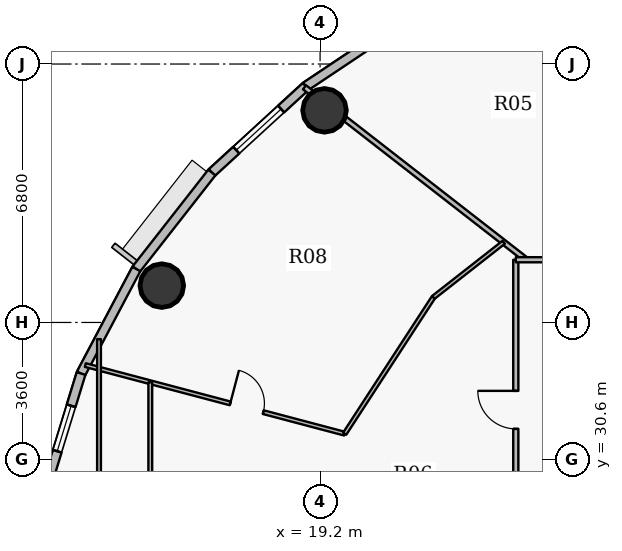
"""IFC4 building model, lengths in metres.
Left out: names, types, materials, properties, quantities, classifications, styles, units other than length and angle.
Written with IfcOpenShell. Run it as: python <this file> out.ifc"""

import sys

from ifc_helpers import new_model, si_unit, direction, frame, frame_2d, origin, origin_2d, place, context, subcontext, project, spatial, rectangle, hollow_circle, extrude, source, transform, mapped, element, fill, save


model = new_model("IFC4")
c1 = context("Model", 3, precision=1e-05, world=origin(), true_north=direction((0.0, 1.0)))
c2 = subcontext(c1, "Body", "Model", "MODEL_VIEW")
j1 = project(units=[si_unit("LENGTHUNIT", "METRE"), si_unit("PLANEANGLEUNIT", "RADIAN")], contexts=[c1])
p1 = place(None, origin())
s1 = spatial("IfcSite", under=j1, at=p1, CompositionType="ELEMENT")
p2 = place(p1, origin())
s2 = spatial("IfcBuilding", under=s1, at=p2, CompositionType="ELEMENT")
p3 = place(p2, frame((0.0, 0.0, 240.3)))
s3 = spatial("IfcBuildingStorey", under=s2, at=p3, CompositionType="ELEMENT", Elevation=240.3)
for number, where, z_axis, x_axis in (
    (1, (19.317, 39.781, 0.0), (0.0, 0.0, 1.0), (1.0, 0.0, 0.0)),
    (2, (15.035, 35.169, 0.0), (0.0, 0.0, 1.0), (1.0, 0.0, 0.0)),
):
    element("IfcColumn", number, at=place(p3, frame(where, z_axis=z_axis, x_axis=x_axis)), inside=s3, PredefinedType="COLUMN", context=c2, shape_type="SweptSolid", body=[
        extrude(hollow_circle(Radius=0.575, WallThickness=0.036, at=origin_2d()), origin(), (0.0, 0.0, 1.0), 3.75),
    ])
p4 = place(p3, frame((18.824, 40.411, 0.0), z_axis=(0.0, 0.0, 1.0), x_axis=(0.831262496074, 0.555880079352, 0.0)))
e3 = element("IfcWall", 3, at=p4, inside=s3, PredefinedType="SOLIDWALL", context=c2, shape_type="SweptSolid", body=[
    extrude(rectangle(XDim=3.484, YDim=0.24, at=frame_2d((1.742, 0.0))), origin(), (0.0, 0.0, 1.0), 3.5),
])
p5 = place(p3, frame((16.352, 38.145, 0.0), z_axis=(0.0, 0.0, 1.0), x_axis=(0.737123922599, 0.675757591694, 0.0)))
e4 = element("IfcWall", 4, at=p5, inside=s3, PredefinedType="SOLIDWALL", context=c2, shape_type="SweptSolid", body=[
    extrude(rectangle(XDim=3.354, YDim=0.24, at=frame_2d((1.677, 0.0))), origin(), (0.0, 0.0, 1.0), 3.5),
])
p6 = place(p5, frame((0.873, 0.0, 0.9)))
e5 = element("IfcOpeningElement", 5, at=p6, cuts=e4, PredefinedType="OPENING", context=c2, shape_type="SweptSolid", body=[
    extrude(rectangle(XDim=1.6, YDim=1.75, at=origin_2d()), frame((0.8, 0.13, 0.875), z_axis=(0.0, -1.0, 0.0), x_axis=(1.0, 0.0, 0.0)), (0.0, 0.0, 1.0), 0.26),
])
p7 = place(p3, frame((14.364, 35.605, 0.0), z_axis=(0.0, 0.0, 1.0), x_axis=(0.616312344705, 0.787501805562, 0.0)))
e6 = element("IfcWall", 6, at=p7, inside=s3, PredefinedType="SOLIDWALL", context=c2, shape_type="SweptSolid", body=[
    extrude(rectangle(XDim=3.225, YDim=0.24, at=frame_2d((1.612, 0.0))), origin(), (0.0, 0.0, 1.0), 3.5),
])
p8 = place(p3, frame((12.91, 32.856, 0.0), z_axis=(0.0, 0.0, 1.0), x_axis=(0.46766049993, 0.883908172157, 0.0)))
e7 = element("IfcWall", 7, at=p8, inside=s3, PredefinedType="SOLIDWALL", context=c2, shape_type="SweptSolid", body=[
    extrude(rectangle(XDim=3.11, YDim=0.24, at=frame_2d((1.555, 0.0))), origin(), (0.0, 0.0, 1.0), 3.5),
])
p9 = place(p3, frame((12.023, 29.964, 0.0), z_axis=(0.0, 0.0, 1.0), x_axis=(0.293132907334, 0.95607170162, 0.0)))
e8 = element("IfcWall", 8, at=p9, inside=s3, PredefinedType="SOLIDWALL", context=c2, shape_type="SweptSolid", body=[
    extrude(rectangle(XDim=3.025, YDim=0.24, at=frame_2d((1.512, 0.0))), origin(), (0.0, 0.0, 1.0), 3.5),
])
p10 = place(p9, frame((0.887, 0.0, 0.9)))
e9 = element("IfcOpeningElement", 9, at=p10, cuts=e8, PredefinedType="OPENING", context=c2, shape_type="SweptSolid", body=[
    extrude(rectangle(XDim=1.25, YDim=1.65, at=origin_2d()), frame((0.625, 0.13, 0.825), z_axis=(0.0, -1.0, 0.0), x_axis=(1.0, 0.0, 0.0)), (0.0, 0.0, 1.0), 0.26),
])
p11 = place(p3, frame((13.022, 33.079, 0.0), z_axis=(0.0, 0.0, 1.0), x_axis=(0.966904841433, -0.255137272097, 0.0)))
e10 = element("IfcWall", 10, at=p11, inside=s3, PredefinedType="PARTITIONING", context=c2, shape_type="SweptSolid", body=[
    extrude(rectangle(XDim=0.373, YDim=0.1, at=frame_2d((0.187, 0.0))), origin(), (0.0, 0.0, 1.0), 3.5),
])
p12 = place(p3, frame((13.392, 32.981, 0.0), z_axis=(0.0, 0.0, 1.0), x_axis=(0.966739802164, -0.255761910595, 0.0)))
e11 = element("IfcWall", 11, at=p12, inside=s3, PredefinedType="PARTITIONING", context=c2, shape_type="SweptSolid", body=[
    extrude(rectangle(XDim=6.677, YDim=0.1, at=frame_2d((3.339, 0.0))), origin(), (0.0, 0.0, 1.0), 2.985),
])
p13 = place(p12, frame((3.561, 0.0, 0.0)))
e12 = element("IfcOpeningElement", 12, at=p13, cuts=e11, PredefinedType="OPENING", context=c2, shape_type="SweptSolid", body=[
    extrude(rectangle(XDim=0.9, YDim=2.1, at=origin_2d()), frame((0.45, 0.06, 1.05), z_axis=(0.0, -1.0, 0.0), x_axis=(1.0, 0.0, 0.0)), (0.0, 0.0, 1.0), 0.12),
])
p14 = place(p3, frame((13.383, 23.724, 0.0), z_axis=(0.0, 0.0, 1.0), x_axis=(0.0, 1.0, 0.0)))
e13 = element("IfcWall", 13, at=p14, inside=s3, PredefinedType="PARTITIONING", context=c2, shape_type="SweptSolid", body=[
    extrude(rectangle(XDim=10.037, YDim=0.1, at=frame_2d((5.019, 0.0))), origin(), (0.0, 0.0, 1.0), 2.935),
])
p15 = place(p14, frame((4.608, 0.0, 0.0)))
e14 = element("IfcOpeningElement", 14, at=p15, cuts=e13, PredefinedType="OPENING", context=c2, shape_type="SweptSolid", body=[
    extrude(rectangle(XDim=0.82, YDim=2.1, at=origin_2d()), frame((0.41, 0.06, 1.05), z_axis=(0.0, -1.0, 0.0), x_axis=(1.0, 0.0, 0.0)), (0.0, 0.0, 1.0), 0.12),
])
p16 = place(p3, frame((14.732, 23.919, 0.0), z_axis=(0.0, 0.0, 1.0), x_axis=(0.0, 1.0, 0.0)))
e15 = element("IfcWall", 15, at=p16, inside=s3, PredefinedType="PARTITIONING", context=c2, shape_type="SweptSolid", body=[
    extrude(rectangle(XDim=8.708, YDim=0.1, at=frame_2d((4.354, 0.0))), origin(), (0.0, 0.0, 1.0), 2.935),
])
p17 = place(p16, frame((3.904, 0.0, 0.0)))
e16 = element("IfcOpeningElement", 16, at=p17, cuts=e15, PredefinedType="OPENING", context=c2, shape_type="SweptSolid", body=[
    extrude(rectangle(XDim=0.9, YDim=2.1, at=origin_2d()), frame((0.45, 0.06, 1.05), z_axis=(0.0, -1.0, 0.0), x_axis=(1.0, 0.0, 0.0)), (0.0, 0.0, 1.0), 0.12),
])
p18 = place(p3, frame((18.791, 40.387, 0.0), z_axis=(0.0, 0.0, 1.0), x_axis=(0.789302404173, -0.614004653701, 0.0)))
e17 = element("IfcWall", 17, at=p18, inside=s3, PredefinedType="PARTITIONING", context=c2, shape_type="SweptSolid", body=[
    extrude(rectangle(XDim=7.39, YDim=0.135, at=frame_2d((3.695, 0.0))), origin(), (0.0, 0.0, 1.0), 2.935),
])
p19 = place(p3, frame((19.847, 31.273, 0.0), z_axis=(0.0, 0.0, 1.0), x_axis=(0.545399280946, 0.83817636828, 0.0)))
e18 = element("IfcWall", 18, at=p19, inside=s3, PredefinedType="PARTITIONING", context=c2, shape_type="SweptSolid", body=[
    extrude(rectangle(XDim=4.28, YDim=0.1, at=frame_2d((2.14, 0.0))), origin(), (0.0, 0.0, 1.0), 2.935),
])
p20 = place(p3, frame((22.182, 34.861, 0.0), z_axis=(0.0, 0.0, 1.0), x_axis=(0.78737344739, 0.616476320994, 0.0)))
e19 = element("IfcWall", 19, at=p20, inside=s3, PredefinedType="PARTITIONING", context=c2, shape_type="SweptSolid", body=[
    extrude(rectangle(XDim=2.35, YDim=0.1, at=frame_2d((1.175, 0.0))), origin(), (0.0, 0.0, 1.0), 2.935),
])
p21 = place(p3, frame((24.35, 27.95, 0.0), z_axis=(0.0, 0.0, 1.0), x_axis=(0.0, 1.0, 0.0)))
e20 = element("IfcWall", 20, at=p21, inside=s3, PredefinedType="PARTITIONING", context=c2, shape_type="SweptSolid", body=[
    extrude(rectangle(XDim=7.9, YDim=0.135, at=frame_2d((3.95, 0.0))), origin(), (0.0, 0.0, 1.0), 2.935),
])
p22 = place(p21, frame((3.45, 0.0, 0.0)))
e21 = element("IfcOpeningElement", 21, at=p22, cuts=e20, PredefinedType="OPENING", context=c2, shape_type="SweptSolid", body=[
    extrude(rectangle(XDim=1.0, YDim=2.15, at=origin_2d()), frame((0.5, 0.078, 1.075), z_axis=(0.0, -1.0, 0.0), x_axis=(1.0, 0.0, 0.0)), (0.0, 0.0, 1.0), 0.155),
])
p23 = place(p3, frame((24.35, 35.85, 0.0), z_axis=(0.0, 0.0, 1.0), x_axis=(1.0, 0.0, 0.0)))
e22 = element("IfcWall", 22, at=p23, inside=s3, PredefinedType="PARTITIONING", context=c2, shape_type="SweptSolid", body=[
    extrude(rectangle(XDim=26.218, YDim=0.135, at=frame_2d((13.109, 0.0))), origin(), (0.0, 0.0, 1.0), 2.935),
])
p24 = place(p23, frame((3.172, 0.0, 0.0)))
e23 = element("IfcOpeningElement", 23, at=p24, cuts=e22, PredefinedType="OPENING", context=c2, shape_type="SweptSolid", body=[
    extrude(rectangle(XDim=1.0, YDim=2.15, at=origin_2d()), frame((0.5, 0.078, 1.075), z_axis=(0.0, -1.0, 0.0), x_axis=(1.0, 0.0, 0.0)), (0.0, 0.0, 1.0), 0.155),
])
p25 = place(p23, frame((18.306, 0.0, 0.0)))
e24 = element("IfcOpeningElement", 24, at=p25, cuts=e22, PredefinedType="OPENING", context=c2, shape_type="SweptSolid", body=[
    extrude(rectangle(XDim=1.0, YDim=2.15, at=origin_2d()), frame((0.5, 0.078, 1.075), z_axis=(0.0, -1.0, 0.0), x_axis=(1.0, 0.0, 0.0)), (0.0, 0.0, 1.0), 0.155),
])
m1 = source(origin(), c2, "Body", "SweptSolid", [
    extrude(rectangle(XDim=1.6, YDim=1.75, at=origin_2d()), frame((0.8, 0.03, 0.875), z_axis=(0.0, -1.0, 0.0), x_axis=(1.0, 0.0, 0.0)), (0.0, 0.0, 1.0), 0.06),
])
p26 = place(p6, origin())
e25 = element("IfcWindow", 25, at=p26, inside=s3, PartitioningType="DOUBLE_PANEL_VERTICAL", PredefinedType="WINDOW", context=c2, shape_type="MappedRepresentation", body=[
    mapped(m1, transform((0.0, 0.0, 0.0), x_axis=(1.0, 0.0, 0.0), y_axis=(0.0, 1.0, 0.0), z_axis=(0.0, 0.0, 1.0), scale=1.0)),
])
fill(e5, e25)
m2 = source(origin(), c2, "Body", "SweptSolid", [
    extrude(rectangle(XDim=1.25, YDim=1.65, at=origin_2d()), frame((0.625, 0.03, 0.825), z_axis=(0.0, -1.0, 0.0), x_axis=(1.0, 0.0, 0.0)), (0.0, 0.0, 1.0), 0.06),
])
p27 = place(p10, origin())
e26 = element("IfcWindow", 26, at=p27, inside=s3, PartitioningType="SINGLE_PANEL", PredefinedType="WINDOW", context=c2, shape_type="MappedRepresentation", body=[
    mapped(m2, transform((0.0, 0.0, 0.0), x_axis=(1.0, 0.0, 0.0), y_axis=(0.0, 1.0, 0.0), z_axis=(0.0, 0.0, 1.0), scale=1.0)),
])
fill(e9, e26)
m3 = source(origin(), c2, "Body", "SweptSolid", [
    extrude(rectangle(XDim=1.0, YDim=2.15, at=origin_2d()), frame((0.5, 0.025, 1.075), z_axis=(0.0, -1.0, 0.0), x_axis=(1.0, 0.0, 0.0)), (0.0, 0.0, 1.0), 0.05),
])
p28 = place(p22, origin())
e27 = element("IfcDoor", 27, at=p28, inside=s3, OperationType="SINGLE_SWING_RIGHT", PredefinedType="DOOR", context=c2, shape_type="MappedRepresentation", body=[
    mapped(m3, transform((0.0, 0.0, 0.0), x_axis=(1.0, 0.0, 0.0), y_axis=(0.0, 1.0, 0.0), z_axis=(0.0, 0.0, 1.0), scale=1.0)),
])
fill(e21, e27)
m4 = source(origin(), c2, "Body", "SweptSolid", [
    extrude(rectangle(XDim=0.9, YDim=2.1, at=origin_2d()), frame((0.45, 0.025, 1.05), z_axis=(0.0, -1.0, 0.0), x_axis=(1.0, 0.0, 0.0)), (0.0, 0.0, 1.0), 0.05),
])
p29 = place(p13, origin())
e28 = element("IfcDoor", 28, at=p29, inside=s3, OperationType="SINGLE_SWING_LEFT", PredefinedType="DOOR", context=c2, shape_type="MappedRepresentation", body=[
    mapped(m4, transform((0.0, 0.0, 0.0), x_axis=(1.0, 0.0, 0.0), y_axis=(0.0, 1.0, 0.0), z_axis=(0.0, 0.0, 1.0), scale=1.0)),
])
fill(e12, e28)
save(model, sys.argv[1])
